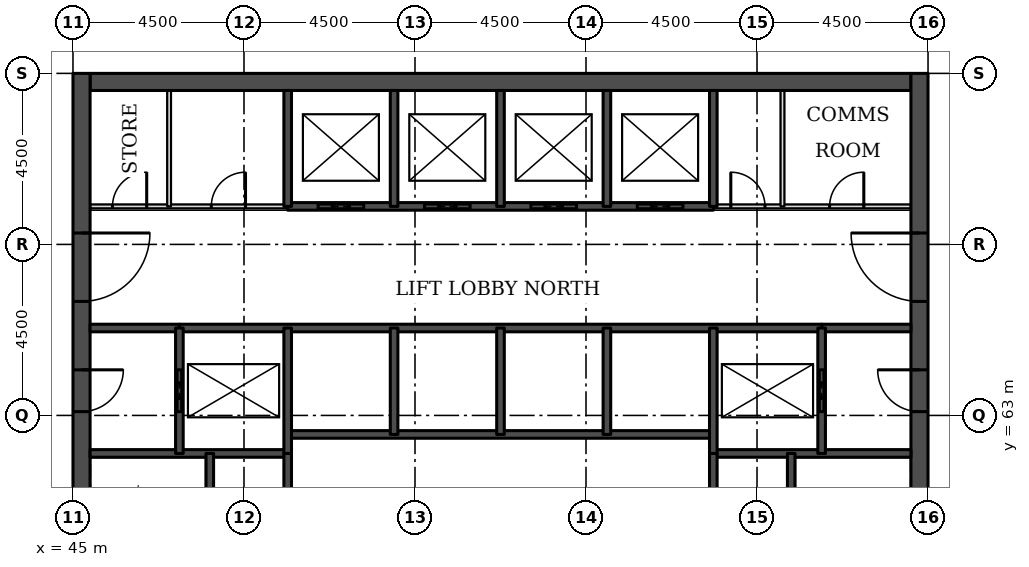
"""IFC4 building model, lengths in metres.
Left out: names, types, materials, properties, quantities, classifications, styles, units other than length and angle.
Written with IfcOpenShell. Run it as: python <this file> out.ifc"""

import sys

from ifc_helpers import new_model, si_unit, direction, frame, frame_2d, origin, place, context, subcontext, project, spatial, rectangle, extrude, element, fill, save


model = new_model("IFC4")
c1 = context("Model", 3, precision=1e-05, world=origin(), true_north=direction((0.0, 1.0)))
c2 = subcontext(c1, "Body", "Model", "MODEL_VIEW")
j1 = project(units=[si_unit("LENGTHUNIT", "METRE"), si_unit("PLANEANGLEUNIT", "RADIAN")], contexts=[c1])
p1 = place(None, origin())
s1 = spatial("IfcSite", under=j1, at=p1, CompositionType="ELEMENT")
p2 = place(p1, origin())
s2 = spatial("IfcBuilding", under=s1, at=p2, CompositionType="ELEMENT")
p3 = place(p2, frame((0.0, 0.0, 101.1)))
s3 = spatial("IfcBuildingStorey", under=s2, at=p3, CompositionType="ELEMENT", Elevation=101.1)
p4 = place(p3, frame((45.45, 71.775, 0.0), z_axis=(0.0, 0.0, 1.0), x_axis=(1.0, 0.0, 0.0)))
e1 = element("IfcWall", 1, at=p4, inside=s3, PredefinedType="SHEAR", context=c2, shape_type="SweptSolid", body=[
    extrude(rectangle(XDim=21.6, YDim=0.45, at=frame_2d((10.8, 0.0))), origin(), (0.0, 0.0, 1.0), 3.7),
])
p5 = place(p3, frame((45.225, 49.5, 0.0), z_axis=(0.0, 0.0, 1.0), x_axis=(0.0, 1.0, 0.0)))
e2 = element("IfcWall", 2, at=p5, inside=s3, PredefinedType="SHEAR", context=c2, shape_type="SweptSolid", body=[
    extrude(rectangle(XDim=22.5, YDim=0.45, at=frame_2d((11.25, 0.0))), origin(), (0.0, 0.0, 1.0), 3.7),
])
p6 = place(p5, frame((4.2, 0.0, 0.0)))
e3 = element("IfcOpeningElement", 3, at=p6, cuts=e2, PredefinedType="OPENING", context=c2, shape_type="SweptSolid", body=[
    extrude(rectangle(XDim=1.8, YDim=2.1, at=frame_2d((0.9, 1.05))), frame((0.0, 0.235, 0.0), z_axis=(0.0, -1.0, 0.0), x_axis=(1.0, 0.0, 0.0)), (0.0, 0.0, 1.0), 0.47),
])
p7 = place(p5, frame((6.9, 0.0, 0.0)))
e4 = element("IfcOpeningElement", 4, at=p7, cuts=e2, PredefinedType="OPENING", context=c2, shape_type="SweptSolid", body=[
    extrude(rectangle(XDim=1.1, YDim=2.1, at=frame_2d((0.55, 1.05))), frame((0.0, 0.235, 0.0), z_axis=(0.0, -1.0, 0.0), x_axis=(1.0, 0.0, 0.0)), (0.0, 0.0, 1.0), 0.47),
])
p8 = place(p5, frame((13.6, 0.0, 0.0)))
e5 = element("IfcOpeningElement", 5, at=p8, cuts=e2, PredefinedType="OPENING", context=c2, shape_type="SweptSolid", body=[
    extrude(rectangle(XDim=1.1, YDim=2.1, at=frame_2d((0.55, 1.05))), frame((0.0, 0.235, 0.0), z_axis=(0.0, -1.0, 0.0), x_axis=(1.0, 0.0, 0.0)), (0.0, 0.0, 1.0), 0.47),
])
p9 = place(p5, frame((16.5, 0.0, 0.0)))
e6 = element("IfcOpeningElement", 6, at=p9, cuts=e2, PredefinedType="OPENING", context=c2, shape_type="SweptSolid", body=[
    extrude(rectangle(XDim=1.8, YDim=2.1, at=frame_2d((0.9, 1.05))), frame((0.0, 0.235, 0.0), z_axis=(0.0, -1.0, 0.0), x_axis=(1.0, 0.0, 0.0)), (0.0, 0.0, 1.0), 0.47),
])
p10 = place(p3, frame((67.275, 49.5, 0.0), z_axis=(0.0, 0.0, 1.0), x_axis=(0.0, 1.0, 0.0)))
e7 = element("IfcWall", 7, at=p10, inside=s3, PredefinedType="SHEAR", context=c2, shape_type="SweptSolid", body=[
    extrude(rectangle(XDim=22.5, YDim=0.45, at=frame_2d((11.25, 0.0))), origin(), (0.0, 0.0, 1.0), 3.7),
])
p11 = place(p10, frame((4.2, 0.0, 0.0)))
e8 = element("IfcOpeningElement", 8, at=p11, cuts=e7, PredefinedType="OPENING", context=c2, shape_type="SweptSolid", body=[
    extrude(rectangle(XDim=1.8, YDim=2.1, at=frame_2d((0.9, 1.05))), frame((0.0, 0.235, 0.0), z_axis=(0.0, -1.0, 0.0), x_axis=(1.0, 0.0, 0.0)), (0.0, 0.0, 1.0), 0.47),
])
p12 = place(p10, frame((6.9, 0.0, 0.0)))
e9 = element("IfcOpeningElement", 9, at=p12, cuts=e7, PredefinedType="OPENING", context=c2, shape_type="SweptSolid", body=[
    extrude(rectangle(XDim=1.1, YDim=2.1, at=frame_2d((0.55, 1.05))), frame((0.0, 0.235, 0.0), z_axis=(0.0, -1.0, 0.0), x_axis=(1.0, 0.0, 0.0)), (0.0, 0.0, 1.0), 0.47),
])
p13 = place(p10, frame((13.6, 0.0, 0.0)))
e10 = element("IfcOpeningElement", 10, at=p13, cuts=e7, PredefinedType="OPENING", context=c2, shape_type="SweptSolid", body=[
    extrude(rectangle(XDim=1.1, YDim=2.1, at=frame_2d((0.55, 1.05))), frame((0.0, 0.235, 0.0), z_axis=(0.0, -1.0, 0.0), x_axis=(1.0, 0.0, 0.0)), (0.0, 0.0, 1.0), 0.47),
])
p14 = place(p10, frame((16.5, 0.0, 0.0)))
e11 = element("IfcOpeningElement", 11, at=p14, cuts=e7, PredefinedType="OPENING", context=c2, shape_type="SweptSolid", body=[
    extrude(rectangle(XDim=1.8, YDim=2.1, at=frame_2d((0.9, 1.05))), frame((0.0, 0.235, 0.0), z_axis=(0.0, -1.0, 0.0), x_axis=(1.0, 0.0, 0.0)), (0.0, 0.0, 1.0), 0.47),
])
for number, where, z_axis, x_axis in (
    (12, (45.45, 62.0, 0.0), (0.0, 0.0, 1.0), (1.0, 0.0, 0.0)),
    (13, (61.85, 62.0, 0.0), (0.0, 0.0, 1.0), (1.0, 0.0, 0.0)),
):
    element("IfcWall", number, at=place(p3, frame(where, z_axis=z_axis, x_axis=x_axis)), inside=s3, PredefinedType="SOLIDWALL", context=c2, shape_type="SweptSolid", body=[
        extrude(rectangle(XDim=5.2, YDim=0.2, at=frame_2d((2.6, 0.0))), origin(), (0.0, 0.0, 1.0), 3.55),
    ])
p15 = place(p3, frame((50.65, 62.5, 0.0), z_axis=(0.0, 0.0, 1.0), x_axis=(1.0, 0.0, 0.0)))
e14 = element("IfcWall", 14, at=p15, inside=s3, PredefinedType="SOLIDWALL", context=c2, shape_type="SweptSolid", body=[
    extrude(rectangle(XDim=11.2, YDim=0.2, at=frame_2d((5.6, 0.0))), origin(), (0.0, 0.0, 1.0), 3.7),
])
for number, where, z_axis, x_axis in (
    (15, (45.45, 65.3, 0.0), (0.0, 0.0, 1.0), (1.0, 0.0, 0.0)),
    (16, (64.7, 65.3, 0.0), (0.0, 0.0, 1.0), (1.0, 0.0, 0.0)),
):
    element("IfcWall", number, at=place(p3, frame(where, z_axis=z_axis, x_axis=x_axis)), inside=s3, PredefinedType="SOLIDWALL", context=c2, shape_type="SweptSolid", body=[
        extrude(rectangle(XDim=2.35, YDim=0.2, at=frame_2d((1.175, 0.0))), origin(), (0.0, 0.0, 1.0), 3.55),
    ])
p16 = place(p3, frame((47.8, 65.3, 0.0), z_axis=(0.0, 0.0, 1.0), x_axis=(1.0, 0.0, 0.0)))
e17 = element("IfcWall", 17, at=p16, inside=s3, PredefinedType="SOLIDWALL", context=c2, shape_type="SweptSolid", body=[
    extrude(rectangle(XDim=16.9, YDim=0.2, at=frame_2d((8.45, 0.0))), origin(), (0.0, 0.0, 1.0), 3.55),
])
p17 = place(p3, frame((45.45, 68.5, 0.0), z_axis=(0.0, 0.0, 1.0), x_axis=(1.0, 0.0, 0.0)))
e18 = element("IfcWall", 18, at=p17, inside=s3, PredefinedType="PARTITIONING", context=c2, shape_type="SweptSolid", body=[
    extrude(rectangle(XDim=5.2, YDim=0.1, at=frame_2d((2.6, 0.0))), origin(), (0.0, 0.0, 1.0), 3.55),
])
p18 = place(p17, frame((0.59, 0.0, 0.0)))
e19 = element("IfcOpeningElement", 19, at=p18, cuts=e18, PredefinedType="OPENING", context=c2, shape_type="SweptSolid", body=[
    extrude(rectangle(XDim=0.9, YDim=2.1, at=frame_2d((0.45, 1.05))), frame((0.0, 0.06, 0.0), z_axis=(0.0, -1.0, 0.0), x_axis=(1.0, 0.0, 0.0)), (0.0, 0.0, 1.0), 0.12),
])
p19 = place(p17, frame((3.19, 0.0, 0.0)))
e20 = element("IfcOpeningElement", 20, at=p19, cuts=e18, PredefinedType="OPENING", context=c2, shape_type="SweptSolid", body=[
    extrude(rectangle(XDim=0.9, YDim=2.1, at=frame_2d((0.45, 1.05))), frame((0.0, 0.06, 0.0), z_axis=(0.0, -1.0, 0.0), x_axis=(1.0, 0.0, 0.0)), (0.0, 0.0, 1.0), 0.12),
])
p20 = place(p3, frame((61.85, 68.5, 0.0), z_axis=(0.0, 0.0, 1.0), x_axis=(1.0, 0.0, 0.0)))
e21 = element("IfcWall", 21, at=p20, inside=s3, PredefinedType="PARTITIONING", context=c2, shape_type="SweptSolid", body=[
    extrude(rectangle(XDim=5.2, YDim=0.1, at=frame_2d((2.6, 0.0))), origin(), (0.0, 0.0, 1.0), 3.55),
])
p21 = place(p20, frame((3.06, 0.0, 0.0)))
e22 = element("IfcOpeningElement", 22, at=p21, cuts=e21, PredefinedType="OPENING", context=c2, shape_type="SweptSolid", body=[
    extrude(rectangle(XDim=0.9, YDim=2.1, at=frame_2d((0.45, 1.05))), frame((0.0, 0.06, 0.0), z_axis=(0.0, -1.0, 0.0), x_axis=(1.0, 0.0, 0.0)), (0.0, 0.0, 1.0), 0.12),
])
p22 = place(p20, frame((0.46, 0.0, 0.0)))
e23 = element("IfcOpeningElement", 23, at=p22, cuts=e21, PredefinedType="OPENING", context=c2, shape_type="SweptSolid", body=[
    extrude(rectangle(XDim=0.9, YDim=2.1, at=frame_2d((0.45, 1.05))), frame((0.0, 0.06, 0.0), z_axis=(0.0, -1.0, 0.0), x_axis=(1.0, 0.0, 0.0)), (0.0, 0.0, 1.0), 0.12),
])
p23 = place(p3, frame((50.65, 68.5, 0.0), z_axis=(0.0, 0.0, 1.0), x_axis=(1.0, 0.0, 0.0)))
e24 = element("IfcWall", 24, at=p23, inside=s3, PredefinedType="SOLIDWALL", context=c2, shape_type="SweptSolid", body=[
    extrude(rectangle(XDim=11.2, YDim=0.2, at=frame_2d((5.6, 0.0))), origin(), (0.0, 0.0, 1.0), 3.55),
])
p24 = place(p23, frame((0.8, 0.0, 0.0)))
e25 = element("IfcOpeningElement", 25, at=p24, cuts=e24, PredefinedType="OPENING", context=c2, shape_type="SweptSolid", body=[
    extrude(rectangle(XDim=1.2, YDim=2.1, at=frame_2d((0.6, 1.05))), frame((0.0, 0.11, 0.0), z_axis=(0.0, -1.0, 0.0), x_axis=(1.0, 0.0, 0.0)), (0.0, 0.0, 1.0), 0.22),
])
p25 = place(p23, frame((3.6, 0.0, 0.0)))
e26 = element("IfcOpeningElement", 26, at=p25, cuts=e24, PredefinedType="OPENING", context=c2, shape_type="SweptSolid", body=[
    extrude(rectangle(XDim=1.2, YDim=2.1, at=frame_2d((0.6, 1.05))), frame((0.0, 0.11, 0.0), z_axis=(0.0, -1.0, 0.0), x_axis=(1.0, 0.0, 0.0)), (0.0, 0.0, 1.0), 0.22),
])
p26 = place(p23, frame((6.4, 0.0, 0.0)))
e27 = element("IfcOpeningElement", 27, at=p26, cuts=e24, PredefinedType="OPENING", context=c2, shape_type="SweptSolid", body=[
    extrude(rectangle(XDim=1.2, YDim=2.1, at=frame_2d((0.6, 1.05))), frame((0.0, 0.11, 0.0), z_axis=(0.0, -1.0, 0.0), x_axis=(1.0, 0.0, 0.0)), (0.0, 0.0, 1.0), 0.22),
])
p27 = place(p23, frame((9.2, 0.0, 0.0)))
e28 = element("IfcOpeningElement", 28, at=p27, cuts=e24, PredefinedType="OPENING", context=c2, shape_type="SweptSolid", body=[
    extrude(rectangle(XDim=1.2, YDim=2.1, at=frame_2d((0.6, 1.05))), frame((0.0, 0.11, 0.0), z_axis=(0.0, -1.0, 0.0), x_axis=(1.0, 0.0, 0.0)), (0.0, 0.0, 1.0), 0.22),
])
p28 = place(p3, frame((47.53, 68.5, 0.0), z_axis=(0.0, 0.0, 1.0), x_axis=(0.0, 1.0, 0.0)))
e29 = element("IfcWall", 29, at=p28, inside=s3, PredefinedType="PARTITIONING", context=c2, shape_type="SweptSolid", body=[
    extrude(rectangle(XDim=3.05, YDim=0.1, at=frame_2d((1.525, 0.0))), origin(), (0.0, 0.0, 1.0), 3.55),
])
p29 = place(p3, frame((47.8, 62.0, 0.0), z_axis=(0.0, 0.0, 1.0), x_axis=(0.0, 1.0, 0.0)))
e30 = element("IfcWall", 30, at=p29, inside=s3, PredefinedType="SOLIDWALL", context=c2, shape_type="SweptSolid", body=[
    extrude(rectangle(XDim=3.3, YDim=0.2, at=frame_2d((1.65, 0.0))), origin(), (0.0, 0.0, 1.0), 3.55),
])
p30 = place(p29, frame((1.1, 0.0, 0.0)))
e31 = element("IfcOpeningElement", 31, at=p30, cuts=e30, PredefinedType="OPENING", context=c2, shape_type="SweptSolid", body=[
    extrude(rectangle(XDim=1.1, YDim=2.1, at=frame_2d((0.55, 1.05))), frame((0.0, 0.11, 0.0), z_axis=(0.0, -1.0, 0.0), x_axis=(1.0, 0.0, 0.0)), (0.0, 0.0, 1.0), 0.22),
])
p31 = place(p3, frame((48.6, 56.2, 0.0), z_axis=(0.0, 0.0, 1.0), x_axis=(0.0, 1.0, 0.0)))
e32 = element("IfcWall", 32, at=p31, inside=s3, PredefinedType="SOLIDWALL", context=c2, shape_type="SweptSolid", body=[
    extrude(rectangle(XDim=5.8, YDim=0.2, at=frame_2d((2.9, 0.0))), origin(), (0.0, 0.0, 1.0), 3.55),
])
p32 = place(p3, frame((50.65, 59.0, 0.0), z_axis=(0.0, 0.0, 1.0), x_axis=(0.0, 1.0, 0.0)))
e33 = element("IfcWall", 33, at=p32, inside=s3, PredefinedType="SOLIDWALL", context=c2, shape_type="SweptSolid", body=[
    extrude(rectangle(XDim=3.0, YDim=0.2, at=frame_2d((1.5, 0.0))), origin(), (0.0, 0.0, 1.0), 3.7),
])
p33 = place(p3, frame((50.65, 62.0, 0.0), z_axis=(0.0, 0.0, 1.0), x_axis=(0.0, 1.0, 0.0)))
e34 = element("IfcWall", 34, at=p33, inside=s3, PredefinedType="SOLIDWALL", context=c2, shape_type="SweptSolid", body=[
    extrude(rectangle(XDim=3.3, YDim=0.2, at=frame_2d((1.65, 0.0))), origin(), (0.0, 0.0, 1.0), 3.55),
])
p34 = place(p3, frame((50.65, 68.5, 0.0), z_axis=(0.0, 0.0, 1.0), x_axis=(0.0, 1.0, 0.0)))
e35 = element("IfcWall", 35, at=p34, inside=s3, PredefinedType="SOLIDWALL", context=c2, shape_type="SweptSolid", body=[
    extrude(rectangle(XDim=3.05, YDim=0.2, at=frame_2d((1.525, 0.0))), origin(), (0.0, 0.0, 1.0), 3.55),
])
p35 = place(p3, frame((53.45, 62.5, 0.0), z_axis=(0.0, 0.0, 1.0), x_axis=(0.0, 1.0, 0.0)))
e36 = element("IfcWall", 36, at=p35, inside=s3, PredefinedType="SOLIDWALL", context=c2, shape_type="SweptSolid", body=[
    extrude(rectangle(XDim=2.8, YDim=0.2, at=frame_2d((1.4, 0.0))), origin(), (0.0, 0.0, 1.0), 3.55),
])
p36 = place(p3, frame((53.45, 68.5, 0.0), z_axis=(0.0, 0.0, 1.0), x_axis=(0.0, 1.0, 0.0)))
e37 = element("IfcWall", 37, at=p36, inside=s3, PredefinedType="SOLIDWALL", context=c2, shape_type="SweptSolid", body=[
    extrude(rectangle(XDim=3.05, YDim=0.2, at=frame_2d((1.525, 0.0))), origin(), (0.0, 0.0, 1.0), 3.55),
])
p37 = place(p3, frame((56.25, 62.5, 0.0), z_axis=(0.0, 0.0, 1.0), x_axis=(0.0, 1.0, 0.0)))
e38 = element("IfcWall", 38, at=p37, inside=s3, PredefinedType="SOLIDWALL", context=c2, shape_type="SweptSolid", body=[
    extrude(rectangle(XDim=2.8, YDim=0.2, at=frame_2d((1.4, 0.0))), origin(), (0.0, 0.0, 1.0), 3.55),
])
p38 = place(p3, frame((56.25, 68.5, 0.0), z_axis=(0.0, 0.0, 1.0), x_axis=(0.0, 1.0, 0.0)))
e39 = element("IfcWall", 39, at=p38, inside=s3, PredefinedType="SOLIDWALL", context=c2, shape_type="SweptSolid", body=[
    extrude(rectangle(XDim=3.05, YDim=0.2, at=frame_2d((1.525, 0.0))), origin(), (0.0, 0.0, 1.0), 3.55),
])
p39 = place(p3, frame((59.05, 62.5, 0.0), z_axis=(0.0, 0.0, 1.0), x_axis=(0.0, 1.0, 0.0)))
e40 = element("IfcWall", 40, at=p39, inside=s3, PredefinedType="SOLIDWALL", context=c2, shape_type="SweptSolid", body=[
    extrude(rectangle(XDim=2.8, YDim=0.2, at=frame_2d((1.4, 0.0))), origin(), (0.0, 0.0, 1.0), 3.55),
])
p40 = place(p3, frame((59.05, 68.5, 0.0), z_axis=(0.0, 0.0, 1.0), x_axis=(0.0, 1.0, 0.0)))
e41 = element("IfcWall", 41, at=p40, inside=s3, PredefinedType="SOLIDWALL", context=c2, shape_type="SweptSolid", body=[
    extrude(rectangle(XDim=3.05, YDim=0.2, at=frame_2d((1.525, 0.0))), origin(), (0.0, 0.0, 1.0), 3.55),
])
p41 = place(p3, frame((61.85, 59.0, 0.0), z_axis=(0.0, 0.0, 1.0), x_axis=(0.0, 1.0, 0.0)))
e42 = element("IfcWall", 42, at=p41, inside=s3, PredefinedType="SOLIDWALL", context=c2, shape_type="SweptSolid", body=[
    extrude(rectangle(XDim=3.0, YDim=0.2, at=frame_2d((1.5, 0.0))), origin(), (0.0, 0.0, 1.0), 3.7),
])
p42 = place(p3, frame((61.85, 62.0, 0.0), z_axis=(0.0, 0.0, 1.0), x_axis=(0.0, 1.0, 0.0)))
e43 = element("IfcWall", 43, at=p42, inside=s3, PredefinedType="SOLIDWALL", context=c2, shape_type="SweptSolid", body=[
    extrude(rectangle(XDim=3.3, YDim=0.2, at=frame_2d((1.65, 0.0))), origin(), (0.0, 0.0, 1.0), 3.55),
])
p43 = place(p3, frame((61.85, 68.5, 0.0), z_axis=(0.0, 0.0, 1.0), x_axis=(0.0, 1.0, 0.0)))
e44 = element("IfcWall", 44, at=p43, inside=s3, PredefinedType="SOLIDWALL", context=c2, shape_type="SweptSolid", body=[
    extrude(rectangle(XDim=3.05, YDim=0.2, at=frame_2d((1.525, 0.0))), origin(), (0.0, 0.0, 1.0), 3.55),
])
p44 = place(p3, frame((63.67, 68.5, 0.0), z_axis=(0.0, 0.0, 1.0), x_axis=(0.0, 1.0, 0.0)))
e45 = element("IfcWall", 45, at=p44, inside=s3, PredefinedType="PARTITIONING", context=c2, shape_type="SweptSolid", body=[
    extrude(rectangle(XDim=3.05, YDim=0.1, at=frame_2d((1.525, 0.0))), origin(), (0.0, 0.0, 1.0), 3.55),
])
p45 = place(p3, frame((63.9, 56.2, 0.0), z_axis=(0.0, 0.0, 1.0), x_axis=(0.0, 1.0, 0.0)))
e46 = element("IfcWall", 46, at=p45, inside=s3, PredefinedType="SOLIDWALL", context=c2, shape_type="SweptSolid", body=[
    extrude(rectangle(XDim=5.8, YDim=0.2, at=frame_2d((2.9, 0.0))), origin(), (0.0, 0.0, 1.0), 3.55),
])
p46 = place(p3, frame((64.7, 62.0, 0.0), z_axis=(0.0, 0.0, 1.0), x_axis=(0.0, 1.0, 0.0)))
e47 = element("IfcWall", 47, at=p46, inside=s3, PredefinedType="SOLIDWALL", context=c2, shape_type="SweptSolid", body=[
    extrude(rectangle(XDim=3.3, YDim=0.2, at=frame_2d((1.65, 0.0))), origin(), (0.0, 0.0, 1.0), 3.55),
])
p47 = place(p46, frame((1.1, 0.0, 0.0)))
e48 = element("IfcOpeningElement", 48, at=p47, cuts=e47, PredefinedType="OPENING", context=c2, shape_type="SweptSolid", body=[
    extrude(rectangle(XDim=1.1, YDim=2.1, at=frame_2d((0.55, 1.05))), frame((0.0, 0.11, 0.0), z_axis=(0.0, -1.0, 0.0), x_axis=(1.0, 0.0, 0.0)), (0.0, 0.0, 1.0), 0.22),
])
p48 = place(p24, origin())
e49 = element("IfcDoor", 49, at=p48, inside=s3, OperationType="DOUBLE_DOOR_SLIDING", PredefinedType="DOOR", context=c2, shape_type="SweptSolid", body=[
    extrude(rectangle(XDim=1.2, YDim=2.1, at=frame_2d((0.6, 1.05))), frame((0.0, 0.025, 0.0), z_axis=(0.0, -1.0, 0.0), x_axis=(1.0, 0.0, 0.0)), (0.0, 0.0, 1.0), 0.05),
])
fill(e25, e49)
p49 = place(p25, origin())
e50 = element("IfcDoor", 50, at=p49, inside=s3, OperationType="DOUBLE_DOOR_SLIDING", PredefinedType="DOOR", context=c2, shape_type="SweptSolid", body=[
    extrude(rectangle(XDim=1.2, YDim=2.1, at=frame_2d((0.6, 1.05))), frame((0.0, 0.025, 0.0), z_axis=(0.0, -1.0, 0.0), x_axis=(1.0, 0.0, 0.0)), (0.0, 0.0, 1.0), 0.05),
])
fill(e26, e50)
p50 = place(p26, origin())
e51 = element("IfcDoor", 51, at=p50, inside=s3, OperationType="DOUBLE_DOOR_SLIDING", PredefinedType="DOOR", context=c2, shape_type="SweptSolid", body=[
    extrude(rectangle(XDim=1.2, YDim=2.1, at=frame_2d((0.6, 1.05))), frame((0.0, 0.025, 0.0), z_axis=(0.0, -1.0, 0.0), x_axis=(1.0, 0.0, 0.0)), (0.0, 0.0, 1.0), 0.05),
])
fill(e27, e51)
p51 = place(p27, origin())
e52 = element("IfcDoor", 52, at=p51, inside=s3, OperationType="DOUBLE_DOOR_SLIDING", PredefinedType="DOOR", context=c2, shape_type="SweptSolid", body=[
    extrude(rectangle(XDim=1.2, YDim=2.1, at=frame_2d((0.6, 1.05))), frame((0.0, 0.025, 0.0), z_axis=(0.0, -1.0, 0.0), x_axis=(1.0, 0.0, 0.0)), (0.0, 0.0, 1.0), 0.05),
])
fill(e28, e52)
p52 = place(p30, origin())
e53 = element("IfcDoor", 53, at=p52, inside=s3, OperationType="DOUBLE_DOOR_SLIDING", PredefinedType="DOOR", context=c2, shape_type="SweptSolid", body=[
    extrude(rectangle(XDim=1.1, YDim=2.1, at=frame_2d((0.55, 1.05))), frame((0.0, 0.025, 0.0), z_axis=(0.0, -1.0, 0.0), x_axis=(1.0, 0.0, 0.0)), (0.0, 0.0, 1.0), 0.05),
])
fill(e31, e53)
p53 = place(p47, origin())
e54 = element("IfcDoor", 54, at=p53, inside=s3, OperationType="DOUBLE_DOOR_SLIDING", PredefinedType="DOOR", context=c2, shape_type="SweptSolid", body=[
    extrude(rectangle(XDim=1.1, YDim=2.1, at=frame_2d((0.55, 1.05))), frame((0.0, 0.025, 0.0), z_axis=(0.0, -1.0, 0.0), x_axis=(1.0, 0.0, 0.0)), (0.0, 0.0, 1.0), 0.05),
])
fill(e48, e54)
p54 = place(p8, frame((1.1, 0.0, 0.0), z_axis=(0.0, 0.0, 1.0), x_axis=(-1.0, 0.0, 0.0)))
e55 = element("IfcDoor", 55, at=p54, inside=s3, OperationType="SINGLE_SWING_LEFT", PredefinedType="DOOR", context=c2, shape_type="SweptSolid", body=[
    extrude(rectangle(XDim=1.1, YDim=2.1, at=frame_2d((0.55, 1.05))), frame((0.0, 0.025, 0.0), z_axis=(0.0, -1.0, 0.0), x_axis=(1.0, 0.0, 0.0)), (0.0, 0.0, 1.0), 0.05),
])
fill(e5, e55)
p55 = place(p9, frame((1.8, 0.0, 0.0), z_axis=(0.0, 0.0, 1.0), x_axis=(-1.0, 0.0, 0.0)))
e56 = element("IfcDoor", 56, at=p55, inside=s3, OperationType="SINGLE_SWING_LEFT", PredefinedType="DOOR", context=c2, shape_type="SweptSolid", body=[
    extrude(rectangle(XDim=1.8, YDim=2.1, at=frame_2d((0.9, 1.05))), frame((0.0, 0.025, 0.0), z_axis=(0.0, -1.0, 0.0), x_axis=(1.0, 0.0, 0.0)), (0.0, 0.0, 1.0), 0.05),
])
fill(e6, e56)
p56 = place(p13, origin())
e57 = element("IfcDoor", 57, at=p56, inside=s3, OperationType="SINGLE_SWING_RIGHT", PredefinedType="DOOR", context=c2, shape_type="SweptSolid", body=[
    extrude(rectangle(XDim=1.1, YDim=2.1, at=frame_2d((0.55, 1.05))), frame((0.0, 0.025, 0.0), z_axis=(0.0, -1.0, 0.0), x_axis=(1.0, 0.0, 0.0)), (0.0, 0.0, 1.0), 0.05),
])
fill(e10, e57)
p57 = place(p14, origin())
e58 = element("IfcDoor", 58, at=p57, inside=s3, OperationType="SINGLE_SWING_RIGHT", PredefinedType="DOOR", context=c2, shape_type="SweptSolid", body=[
    extrude(rectangle(XDim=1.8, YDim=2.1, at=frame_2d((0.9, 1.05))), frame((0.0, 0.025, 0.0), z_axis=(0.0, -1.0, 0.0), x_axis=(1.0, 0.0, 0.0)), (0.0, 0.0, 1.0), 0.05),
])
fill(e11, e58)
p58 = place(p21, origin())
e59 = element("IfcDoor", 59, at=p58, inside=s3, OperationType="SINGLE_SWING_RIGHT", PredefinedType="DOOR", context=c2, shape_type="SweptSolid", body=[
    extrude(rectangle(XDim=0.9, YDim=2.1, at=frame_2d((0.45, 1.05))), frame((0.0, 0.025, 0.0), z_axis=(0.0, -1.0, 0.0), x_axis=(1.0, 0.0, 0.0)), (0.0, 0.0, 1.0), 0.05),
])
fill(e22, e59)
p59 = place(p22, origin())
e60 = element("IfcDoor", 60, at=p59, inside=s3, OperationType="SINGLE_SWING_LEFT", PredefinedType="DOOR", context=c2, shape_type="SweptSolid", body=[
    extrude(rectangle(XDim=0.9, YDim=2.1, at=frame_2d((0.45, 1.05))), frame((0.0, 0.025, 0.0), z_axis=(0.0, -1.0, 0.0), x_axis=(1.0, 0.0, 0.0)), (0.0, 0.0, 1.0), 0.05),
])
fill(e23, e60)
p60 = place(p18, origin())
e61 = element("IfcDoor", 61, at=p60, inside=s3, OperationType="SINGLE_SWING_RIGHT", PredefinedType="DOOR", context=c2, shape_type="SweptSolid", body=[
    extrude(rectangle(XDim=0.9, YDim=2.1, at=frame_2d((0.45, 1.05))), frame((0.0, 0.025, 0.0), z_axis=(0.0, -1.0, 0.0), x_axis=(1.0, 0.0, 0.0)), (0.0, 0.0, 1.0), 0.05),
])
fill(e19, e61)
p61 = place(p19, origin())
e62 = element("IfcDoor", 62, at=p61, inside=s3, OperationType="SINGLE_SWING_RIGHT", PredefinedType="DOOR", context=c2, shape_type="SweptSolid", body=[
    extrude(rectangle(XDim=0.9, YDim=2.1, at=frame_2d((0.45, 1.05))), frame((0.0, 0.025, 0.0), z_axis=(0.0, -1.0, 0.0), x_axis=(1.0, 0.0, 0.0)), (0.0, 0.0, 1.0), 0.05),
])
fill(e20, e62)
save(model, sys.argv[1])
